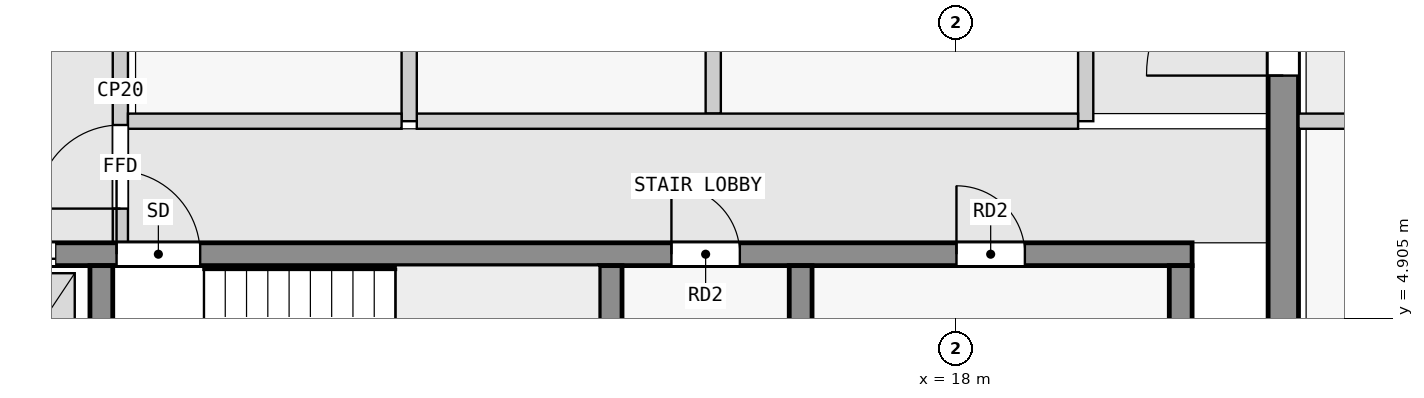
"""IFC4 building model, lengths in metres.
Left out: names, types, materials, properties, quantities, classifications, styles, units other than length and angle.
Written with IfcOpenShell. Run it as: python <this file> out.ifc"""

import sys

from ifc_helpers import new_model, si_unit, direction, frame, frame_2d, origin, place, context, subcontext, project, spatial, rectangle, extrude, element, fill, save


model = new_model("IFC4")
c1 = context("Model", 3, precision=1e-05, world=origin(), true_north=direction((0.0, 1.0)))
c2 = subcontext(c1, "Body", "Model", "MODEL_VIEW")
j1 = project(units=[si_unit("LENGTHUNIT", "METRE"), si_unit("PLANEANGLEUNIT", "RADIAN")], contexts=[c1])
p1 = place(None, origin())
s1 = spatial("IfcSite", under=j1, at=p1, CompositionType="ELEMENT")
p2 = place(p1, origin())
s2 = spatial("IfcBuilding", under=s1, at=p2, CompositionType="ELEMENT")
p3 = place(p2, frame((0.0, 0.0, 294.9)))
s3 = spatial("IfcBuildingStorey", under=s2, at=p3, CompositionType="ELEMENT", Elevation=294.9)
p4 = place(p3, frame((22.3, 2.5, 0.0), z_axis=(0.0, 0.0, 1.0), x_axis=(0.0, 1.0, 0.0)))
e1 = element("IfcWall", 1, at=p4, inside=s3, PredefinedType="SHEAR", context=c2, shape_type="SweptSolid", body=[
    extrude(rectangle(XDim=15.1, YDim=0.4, at=frame_2d((7.55, 0.0))), origin(), (0.0, 0.0, 1.0), 3.25),
])
p5 = place(p4, frame((5.6, 0.0, 0.0)))
e2 = element("IfcOpeningElement", 2, at=p5, cuts=e1, PredefinedType="OPENING", context=c2, shape_type="SweptSolid", body=[
    extrude(rectangle(XDim=1.8, YDim=2.1, at=frame_2d((0.9, 1.05))), frame((0.0, 0.21, 0.0), z_axis=(0.0, -1.0, 0.0), x_axis=(1.0, 0.0, 0.0)), (0.0, 0.0, 1.0), 0.42),
])
for number, where, z_axis, x_axis in (
    (3, (6.75, 2.8, 0.0), (0.0, 0.0, 1.0), (0.0, 1.0, 0.0)),
    (4, (13.45, 2.8, 0.0), (0.0, 0.0, 1.0), (0.0, 1.0, 0.0)),
    (5, (15.95, 2.8, 0.0), (0.0, 0.0, 1.0), (0.0, 1.0, 0.0)),
    (6, (20.95, 2.8, 0.0), (0.0, 0.0, 1.0), (0.0, 1.0, 0.0)),
):
    element("IfcWall", number, at=place(p3, frame(where, z_axis=z_axis, x_axis=x_axis)), inside=s3, PredefinedType="SHEAR", context=c2, shape_type="SweptSolid", body=[
        extrude(rectangle(XDim=2.8, YDim=0.3, at=frame_2d((1.4, 0.0))), origin(), (0.0, 0.0, 1.0), 3.25),
    ])
p6 = place(p3, frame((2.3, 5.75, 0.0), z_axis=(0.0, 0.0, 1.0), x_axis=(1.0, 0.0, 0.0)))
e7 = element("IfcWall", 7, at=p6, inside=s3, PredefinedType="SHEAR", context=c2, shape_type="SweptSolid", body=[
    extrude(rectangle(XDim=18.8, YDim=0.3, at=frame_2d((9.4, 0.0))), origin(), (0.0, 0.0, 1.0), 3.25),
])
p7 = place(p6, frame((4.65, 0.0, 0.0)))
e8 = element("IfcOpeningElement", 8, at=p7, cuts=e7, PredefinedType="OPENING", context=c2, shape_type="SweptSolid", body=[
    extrude(rectangle(XDim=1.1, YDim=2.1, at=frame_2d((0.55, 1.05))), frame((0.0, 0.16, 0.0), z_axis=(0.0, -1.0, 0.0), x_axis=(1.0, 0.0, 0.0)), (0.0, 0.0, 1.0), 0.32),
])
p8 = place(p6, frame((0.45, 0.0, 0.0)))
e9 = element("IfcOpeningElement", 9, at=p8, cuts=e7, PredefinedType="OPENING", context=c2, shape_type="SweptSolid", body=[
    extrude(rectangle(XDim=1.1, YDim=2.1, at=frame_2d((0.55, 1.05))), frame((0.0, 0.16, 0.0), z_axis=(0.0, -1.0, 0.0), x_axis=(1.0, 0.0, 0.0)), (0.0, 0.0, 1.0), 0.32),
])
p9 = place(p6, frame((2.75, 0.0, 0.0)))
e10 = element("IfcOpeningElement", 10, at=p9, cuts=e7, PredefinedType="OPENING", context=c2, shape_type="SweptSolid", body=[
    extrude(rectangle(XDim=1.1, YDim=2.1, at=frame_2d((0.55, 1.05))), frame((0.0, 0.16, 0.0), z_axis=(0.0, -1.0, 0.0), x_axis=(1.0, 0.0, 0.0)), (0.0, 0.0, 1.0), 0.32),
])
p10 = place(p6, frame((11.95, 0.0, 0.0)))
e11 = element("IfcOpeningElement", 11, at=p10, cuts=e7, PredefinedType="OPENING", context=c2, shape_type="SweptSolid", body=[
    extrude(rectangle(XDim=0.9, YDim=2.1, at=frame_2d((0.45, 1.05))), frame((0.0, 0.16, 0.0), z_axis=(0.0, -1.0, 0.0), x_axis=(1.0, 0.0, 0.0)), (0.0, 0.0, 1.0), 0.32),
])
p11 = place(p6, frame((15.7, 0.0, 0.0)))
e12 = element("IfcOpeningElement", 12, at=p11, cuts=e7, PredefinedType="OPENING", context=c2, shape_type="SweptSolid", body=[
    extrude(rectangle(XDim=0.9, YDim=2.1, at=frame_2d((0.45, 1.05))), frame((0.0, 0.16, 0.0), z_axis=(0.0, -1.0, 0.0), x_axis=(1.0, 0.0, 0.0)), (0.0, 0.0, 1.0), 0.32),
])
p12 = place(p3, frame((7.0, 5.9, 0.0), z_axis=(0.0, 0.0, 1.0), x_axis=(0.0, 1.0, 0.0)))
e13 = element("IfcWall", 13, at=p12, inside=s3, PredefinedType="PARTITIONING", context=c2, shape_type="SweptSolid", body=[
    extrude(rectangle(XDim=4.0, YDim=0.2, at=frame_2d((2.0, 0.0))), origin(), (0.0, 0.0, 1.0), 3.25),
])
p13 = place(p12, frame((0.45, 0.0, 0.0)))
e14 = element("IfcOpeningElement", 14, at=p13, cuts=e13, PredefinedType="OPENING", context=c2, shape_type="SweptSolid", body=[
    extrude(rectangle(XDim=1.1, YDim=2.1, at=frame_2d((0.55, 1.05))), frame((0.0, 0.11, 0.0), z_axis=(0.0, -1.0, 0.0), x_axis=(1.0, 0.0, 0.0)), (0.0, 0.0, 1.0), 0.22),
])
p14 = place(p3, frame((7.1, 7.5, 0.0), z_axis=(0.0, 0.0, 1.0), x_axis=(1.0, 0.0, 0.0)))
e15 = element("IfcWall", 15, at=p14, inside=s3, PredefinedType="PARTITIONING", context=c2, shape_type="SweptSolid", body=[
    extrude(rectangle(XDim=3.6, YDim=0.2, at=frame_2d((1.8, 0.0))), origin(), (0.0, 0.0, 1.0), 3.25),
])
p15 = place(p3, frame((10.8, 7.5, 0.0), z_axis=(0.0, 0.0, 1.0), x_axis=(0.0, 1.0, 0.0)))
e16 = element("IfcWall", 16, at=p15, inside=s3, PredefinedType="PARTITIONING", context=c2, shape_type="SweptSolid", body=[
    extrude(rectangle(XDim=4.7, YDim=0.2, at=frame_2d((2.35, 0.0))), origin(), (0.0, 0.0, 1.0), 3.25),
])
p16 = place(p3, frame((10.9, 7.5, 0.0), z_axis=(0.0, 0.0, 1.0), x_axis=(1.0, 0.0, 0.0)))
e17 = element("IfcWall", 17, at=p16, inside=s3, PredefinedType="PARTITIONING", context=c2, shape_type="SweptSolid", body=[
    extrude(rectangle(XDim=8.7, YDim=0.2, at=frame_2d((4.35, 0.0))), origin(), (0.0, 0.0, 1.0), 3.25),
])
p17 = place(p3, frame((19.7, 7.5, 0.0), z_axis=(0.0, 0.0, 1.0), x_axis=(0.0, 1.0, 0.0)))
e18 = element("IfcWall", 18, at=p17, inside=s3, PredefinedType="PARTITIONING", context=c2, shape_type="SweptSolid", body=[
    extrude(rectangle(XDim=4.7, YDim=0.2, at=frame_2d((2.35, 0.0))), origin(), (0.0, 0.0, 1.0), 3.25),
])
for number, where, z_axis, x_axis in (
    (19, (14.8, 7.6, 0.0), (0.0, 0.0, 1.0), (0.0, 1.0, 0.0)),
    (20, (27.0, 7.5, 0.0), (0.0, 0.0, 1.0), (-1.0, 0.0, 0.0)),
):
    element("IfcWall", number, at=place(p3, frame(where, z_axis=z_axis, x_axis=x_axis)), inside=s3, PredefinedType="PARTITIONING", context=c2, shape_type="SweptSolid", body=[
        extrude(rectangle(XDim=4.5, YDim=0.2, at=frame_2d((2.25, 0.0))), origin(), (0.0, 0.0, 1.0), 3.25),
    ])
p18 = place(p13, origin())
e21 = element("IfcDoor", 21, at=p18, inside=s3, OperationType="SINGLE_SWING_LEFT", PredefinedType="DOOR", context=c2, shape_type="SweptSolid", body=[
    extrude(rectangle(XDim=1.1, YDim=2.1, at=frame_2d((0.55, 1.05))), frame((0.0, 0.025, 0.0), z_axis=(0.0, -1.0, 0.0), x_axis=(1.0, 0.0, 0.0)), (0.0, 0.0, 1.0), 0.05),
])
fill(e14, e21)
p19 = place(p7, origin())
e22 = element("IfcDoor", 22, at=p19, inside=s3, OperationType="SINGLE_SWING_LEFT", PredefinedType="DOOR", context=c2, shape_type="SweptSolid", body=[
    extrude(rectangle(XDim=1.1, YDim=2.1, at=frame_2d((0.55, 1.05))), frame((0.0, 0.025, 0.0), z_axis=(0.0, -1.0, 0.0), x_axis=(1.0, 0.0, 0.0)), (0.0, 0.0, 1.0), 0.05),
])
fill(e8, e22)
p20 = place(p9, origin())
e23 = element("IfcDoor", 23, at=p20, inside=s3, OperationType="DOUBLE_DOOR_SLIDING", PredefinedType="DOOR", context=c2, shape_type="SweptSolid", body=[
    extrude(rectangle(XDim=1.1, YDim=2.1, at=frame_2d((0.55, 1.05))), frame((0.0, 0.025, 0.0), z_axis=(0.0, -1.0, 0.0), x_axis=(1.0, 0.0, 0.0)), (0.0, 0.0, 1.0), 0.05),
])
fill(e10, e23)
p21 = place(p5, origin())
e24 = element("IfcDoor", 24, at=p21, inside=s3, OperationType="DOUBLE_DOOR_SINGLE_SWING", PredefinedType="DOOR", context=c2, shape_type="SweptSolid", body=[
    extrude(rectangle(XDim=1.8, YDim=2.1, at=frame_2d((0.9, 1.05))), frame((0.0, 0.025, 0.0), z_axis=(0.0, -1.0, 0.0), x_axis=(1.0, 0.0, 0.0)), (0.0, 0.0, 1.0), 0.05),
])
fill(e2, e24)
p22 = place(p10, origin())
e25 = element("IfcDoor", 25, at=p22, inside=s3, OperationType="SINGLE_SWING_LEFT", PredefinedType="DOOR", context=c2, shape_type="SweptSolid", body=[
    extrude(rectangle(XDim=0.9, YDim=2.1, at=frame_2d((0.45, 1.05))), frame((0.0, 0.025, 0.0), z_axis=(0.0, -1.0, 0.0), x_axis=(1.0, 0.0, 0.0)), (0.0, 0.0, 1.0), 0.05),
])
fill(e11, e25)
p23 = place(p11, origin())
e26 = element("IfcDoor", 26, at=p23, inside=s3, OperationType="SINGLE_SWING_LEFT", PredefinedType="DOOR", context=c2, shape_type="SweptSolid", body=[
    extrude(rectangle(XDim=0.9, YDim=2.1, at=frame_2d((0.45, 1.05))), frame((0.0, 0.025, 0.0), z_axis=(0.0, -1.0, 0.0), x_axis=(1.0, 0.0, 0.0)), (0.0, 0.0, 1.0), 0.05),
])
fill(e12, e26)
save(model, sys.argv[1])
